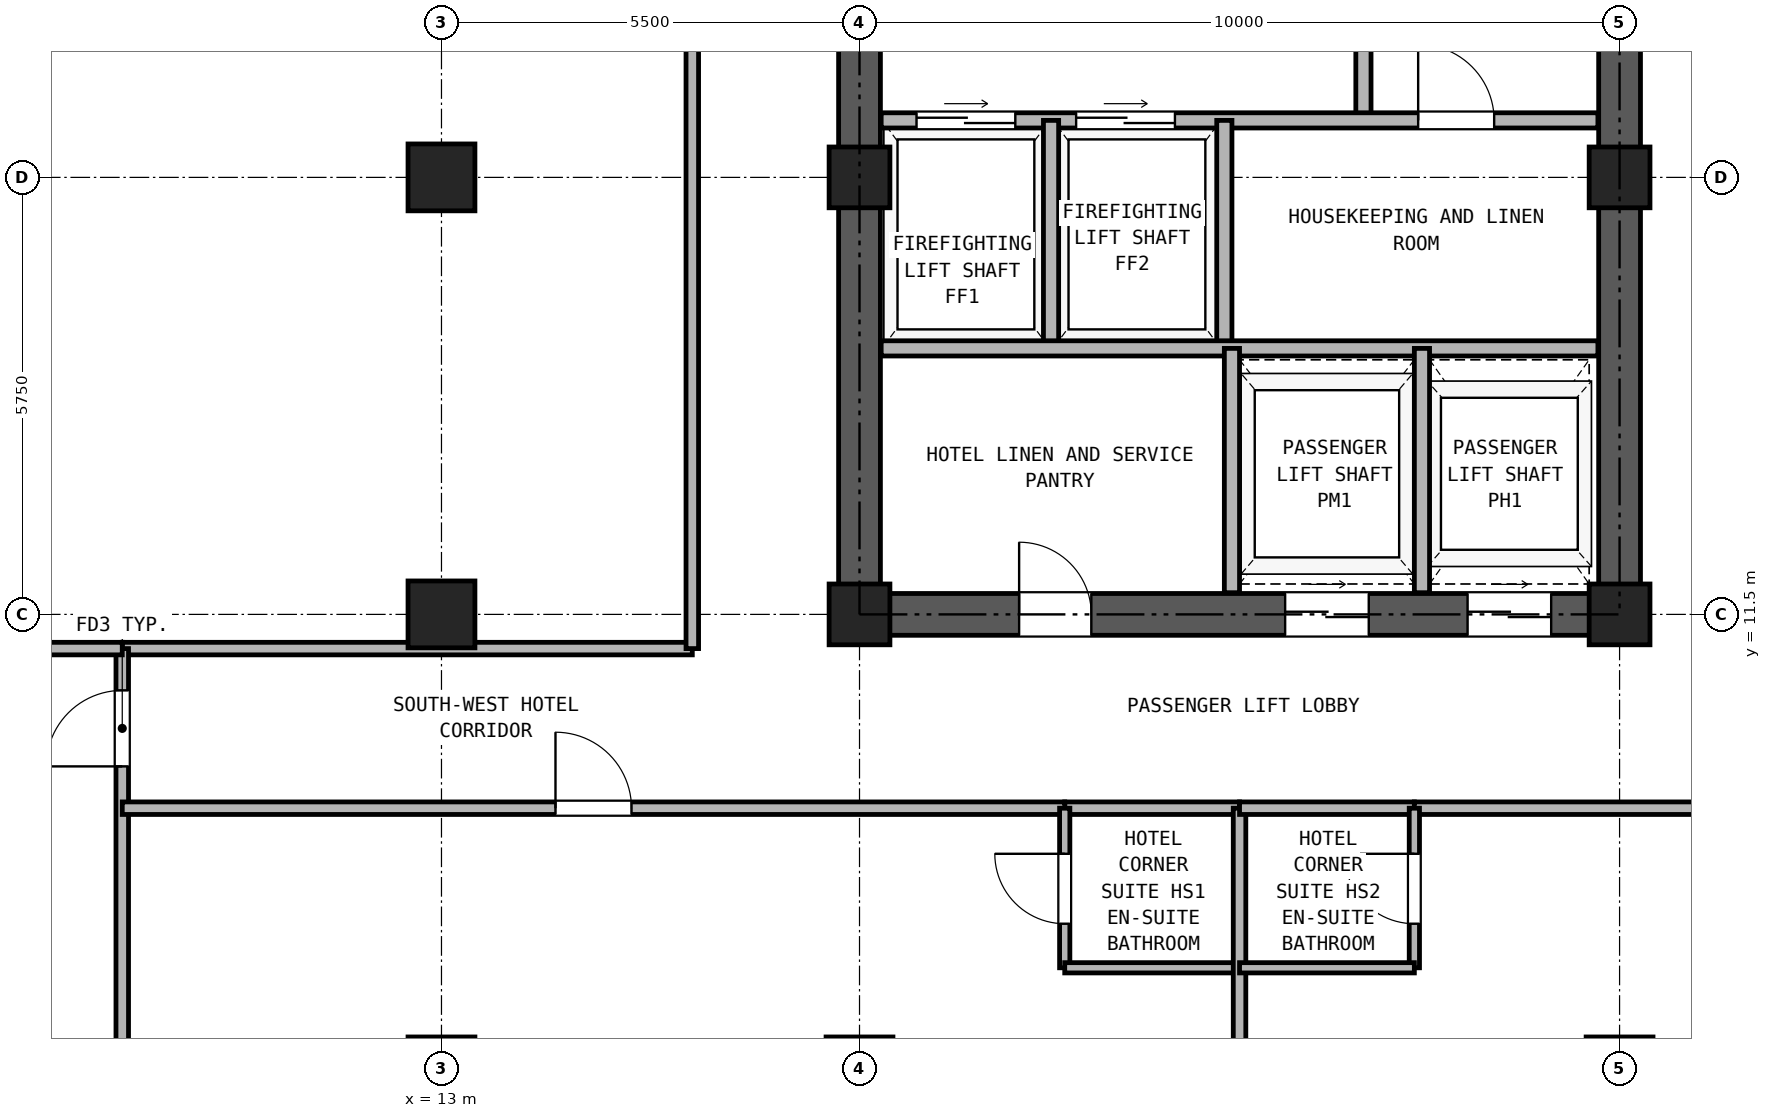
"""IFC4 building model, lengths in metres.
Left out: names, types, materials, properties, quantities, classifications, styles, units other than length and angle.
Written with IfcOpenShell. Run it as: python <this file> out.ifc"""

import sys

from ifc_helpers import new_model, si_unit, direction, frame, frame_2d, origin, origin_2d, place, context, subcontext, project, spatial, rectangle, hollow_rectangle, extrude, source, transform, mapped, element, fill, save


model = new_model("IFC4")
c1 = context("Model", 3, precision=1e-05, world=origin(), true_north=direction((0.0, 1.0)))
c2 = subcontext(c1, "Body", "Model", "MODEL_VIEW")
j1 = project(units=[si_unit("LENGTHUNIT", "METRE"), si_unit("PLANEANGLEUNIT", "RADIAN")], contexts=[c1])
p1 = place(None, origin())
s1 = spatial("IfcSite", under=j1, at=p1, CompositionType="ELEMENT")
p2 = place(p1, origin())
s2 = spatial("IfcBuilding", under=s1, at=p2, CompositionType="ELEMENT")
p3 = place(p2, frame((0.0, 0.0, 140.7)))
s3 = spatial("IfcBuildingStorey", under=s2, at=p3, CompositionType="ELEMENT", Elevation=140.7)
m1 = source(origin(), c2, "Body", "SweptSolid", [
    extrude(hollow_rectangle(XDim=0.88, YDim=0.88, WallThickness=0.05, at=origin_2d()), origin(), (0.0, 0.0, 1.0), 2.84),
])
for number, where, z_axis, x_axis in (
    (1, (13.0, 5.5, 0.0), (0.0, 0.0, 1.0), (1.0, 0.0, 0.0)),
    (2, (13.0, 11.5, 0.0), (0.0, 0.0, 1.0), (1.0, 0.0, 0.0)),
    (3, (13.0, 17.25, 0.0), (0.0, 0.0, 1.0), (1.0, 0.0, 0.0)),
    (4, (18.5, 5.5, 0.0), (0.0, 0.0, 1.0), (1.0, 0.0, 0.0)),
):
    element("IfcColumn", number, at=place(p3, frame(where, z_axis=z_axis, x_axis=x_axis)), inside=s3, PredefinedType="COLUMN", context=c2, shape_type="MappedRepresentation", body=[
        mapped(m1, transform((0.0, 0.0, 0.0), x_axis=(1.0, 0.0, 0.0), y_axis=(0.0, 1.0, 0.0), z_axis=(0.0, 0.0, 1.0), scale=1.0)),
    ])
m2 = source(origin(), c2, "Body", "SweptSolid", [
    extrude(hollow_rectangle(XDim=0.8, YDim=0.8, WallThickness=0.045, at=origin_2d()), origin(), (0.0, 0.0, 1.0), 2.84),
])
for number, where, z_axis, x_axis in (
    (5, (18.5, 11.5, 0.0), (0.0, 0.0, 1.0), (1.0, 0.0, 0.0)),
    (6, (18.5, 17.25, 0.0), (0.0, 0.0, 1.0), (1.0, 0.0, 0.0)),
):
    element("IfcColumn", number, at=place(p3, frame(where, z_axis=z_axis, x_axis=x_axis)), inside=s3, PredefinedType="COLUMN", context=c2, shape_type="MappedRepresentation", body=[
        mapped(m2, transform((0.0, 0.0, 0.0), x_axis=(1.0, 0.0, 0.0), y_axis=(0.0, 1.0, 0.0), z_axis=(0.0, 0.0, 1.0), scale=1.0)),
    ])
p4 = place(p3, frame((28.5, 5.5, 0.0), z_axis=(0.0, 0.0, 1.0), x_axis=(1.0, 0.0, 0.0)))
e7 = element("IfcColumn", 7, at=p4, inside=s3, PredefinedType="COLUMN", context=c2, shape_type="MappedRepresentation", body=[
    mapped(m1, transform((0.0, 0.0, 0.0), x_axis=(1.0, 0.0, 0.0), y_axis=(0.0, 1.0, 0.0), z_axis=(0.0, 0.0, 1.0), scale=1.0)),
])
for number, where, z_axis, x_axis in (
    (8, (28.5, 11.5, 0.0), (0.0, 0.0, 1.0), (1.0, 0.0, 0.0)),
    (9, (28.5, 17.25, 0.0), (0.0, 0.0, 1.0), (1.0, 0.0, 0.0)),
):
    element("IfcColumn", number, at=place(p3, frame(where, z_axis=z_axis, x_axis=x_axis)), inside=s3, PredefinedType="COLUMN", context=c2, shape_type="MappedRepresentation", body=[
        mapped(m2, transform((0.0, 0.0, 0.0), x_axis=(1.0, 0.0, 0.0), y_axis=(0.0, 1.0, 0.0), z_axis=(0.0, 0.0, 1.0), scale=1.0)),
    ])
p5 = place(p3, frame((18.225, 11.5, 0.0), z_axis=(0.0, 0.0, 1.0), x_axis=(1.0, 0.0, 0.0)))
e10 = element("IfcWall", 10, at=p5, inside=s3, PredefinedType="SHEAR", context=c2, shape_type="SweptSolid", body=[
    extrude(rectangle(XDim=10.55, YDim=0.55, at=frame_2d((5.275, 0.0))), origin(), (0.0, 0.0, 1.0), 2.84),
])
p6 = place(p5, frame((2.375, 0.0, 0.0)))
e11 = element("IfcOpeningElement", 11, at=p6, cuts=e10, PredefinedType="OPENING", context=c2, shape_type="SweptSolid", body=[
    extrude(rectangle(XDim=0.95, YDim=2.15, at=frame_2d((0.475, 1.075))), frame((0.0, 0.285, 0.0), z_axis=(0.0, -1.0, 0.0), x_axis=(1.0, 0.0, 0.0)), (0.0, 0.0, 1.0), 0.57),
])
p7 = place(p5, frame((5.875, 0.0, 0.0)))
e12 = element("IfcOpeningElement", 12, at=p7, cuts=e10, PredefinedType="OPENING", context=c2, shape_type="SweptSolid", body=[
    extrude(rectangle(XDim=1.1, YDim=2.25, at=frame_2d((0.55, 1.125))), frame((0.0, 0.285, 0.0), z_axis=(0.0, -1.0, 0.0), x_axis=(1.0, 0.0, 0.0)), (0.0, 0.0, 1.0), 0.57),
])
p8 = place(p5, frame((8.275, 0.0, 0.0)))
e13 = element("IfcOpeningElement", 13, at=p8, cuts=e10, PredefinedType="OPENING", context=c2, shape_type="SweptSolid", body=[
    extrude(rectangle(XDim=1.1, YDim=2.25, at=frame_2d((0.55, 1.125))), frame((0.0, 0.285, 0.0), z_axis=(0.0, -1.0, 0.0), x_axis=(1.0, 0.0, 0.0)), (0.0, 0.0, 1.0), 0.57),
])
p9 = place(p3, frame((18.5, 11.775, 0.0), z_axis=(0.0, 0.0, 1.0), x_axis=(0.0, 1.0, 0.0)))
e14 = element("IfcWall", 14, at=p9, inside=s3, PredefinedType="SHEAR", context=c2, shape_type="SweptSolid", body=[
    extrude(rectangle(XDim=16.7, YDim=0.55, at=frame_2d((8.35, 0.0))), origin(), (0.0, 0.0, 1.0), 2.84),
])
p10 = place(p9, frame((7.375, 0.0, 0.0)))
e15 = element("IfcOpeningElement", 15, at=p10, cuts=e14, PredefinedType="OPENING", context=c2, shape_type="SweptSolid", body=[
    extrude(rectangle(XDim=1.15, YDim=2.2, at=frame_2d((0.575, 1.1))), frame((0.0, 0.285, 0.0), z_axis=(0.0, -1.0, 0.0), x_axis=(1.0, 0.0, 0.0)), (0.0, 0.0, 1.0), 0.57),
])
p11 = place(p3, frame((28.5, 11.775, 0.0), z_axis=(0.0, 0.0, 1.0), x_axis=(0.0, 1.0, 0.0)))
e16 = element("IfcWall", 16, at=p11, inside=s3, PredefinedType="SHEAR", context=c2, shape_type="SweptSolid", body=[
    extrude(rectangle(XDim=16.7, YDim=0.55, at=frame_2d((8.35, 0.0))), origin(), (0.0, 0.0, 1.0), 2.84),
])
p12 = place(p11, frame((7.375, 0.0, 0.0)))
e17 = element("IfcOpeningElement", 17, at=p12, cuts=e16, PredefinedType="OPENING", context=c2, shape_type="SweptSolid", body=[
    extrude(rectangle(XDim=1.15, YDim=2.2, at=frame_2d((0.575, 1.1))), frame((0.0, 0.285, 0.0), z_axis=(0.0, -1.0, 0.0), x_axis=(1.0, 0.0, 0.0)), (0.0, 0.0, 1.0), 0.57),
])
p13 = place(p3, frame((25.13, 18.0, 0.0), z_axis=(0.0, 0.0, 1.0), x_axis=(0.0, 1.0, 0.0)))
e18 = element("IfcWall", 18, at=p13, inside=s3, PredefinedType="PARTITIONING", context=c2, shape_type="SweptSolid", body=[
    extrude(rectangle(XDim=3.39, YDim=0.2, at=frame_2d((1.695, 0.0))), origin(), (0.0, 0.0, 1.0), 2.84),
])
p14 = place(p13, frame((1.1, 0.0, 0.0)))
e19 = element("IfcOpeningElement", 19, at=p14, cuts=e18, PredefinedType="OPENING", context=c2, shape_type="SweptSolid", body=[
    extrude(rectangle(XDim=1.15, YDim=2.2, at=frame_2d((0.575, 1.1))), frame((0.0, 0.11, 0.0), z_axis=(0.0, -1.0, 0.0), x_axis=(1.0, 0.0, 0.0)), (0.0, 0.0, 1.0), 0.22),
])
p15 = place(p3, frame((18.785, 18.0, 0.0), z_axis=(0.0, 0.0, 1.0), x_axis=(1.0, 0.0, 0.0)))
e20 = element("IfcWall", 20, at=p15, inside=s3, PredefinedType="PARTITIONING", context=c2, shape_type="SweptSolid", body=[
    extrude(rectangle(XDim=9.43, YDim=0.2, at=frame_2d((4.715, 0.0))), origin(), (0.0, 0.0, 1.0), 2.84),
])
p16 = place(p15, frame((0.465, 0.0, 0.0)))
e21 = element("IfcOpeningElement", 21, at=p16, cuts=e20, PredefinedType="OPENING", context=c2, shape_type="SweptSolid", body=[
    extrude(rectangle(XDim=1.3, YDim=2.3, at=frame_2d((0.65, 1.15))), frame((0.0, 0.11, 0.0), z_axis=(0.0, -1.0, 0.0), x_axis=(1.0, 0.0, 0.0)), (0.0, 0.0, 1.0), 0.22),
])
p17 = place(p15, frame((2.565, 0.0, 0.0)))
e22 = element("IfcOpeningElement", 22, at=p17, cuts=e20, PredefinedType="OPENING", context=c2, shape_type="SweptSolid", body=[
    extrude(rectangle(XDim=1.3, YDim=2.3, at=frame_2d((0.65, 1.15))), frame((0.0, 0.11, 0.0), z_axis=(0.0, -1.0, 0.0), x_axis=(1.0, 0.0, 0.0)), (0.0, 0.0, 1.0), 0.22),
])
p18 = place(p15, frame((7.065, 0.0, 0.0)))
e23 = element("IfcOpeningElement", 23, at=p18, cuts=e20, PredefinedType="OPENING", context=c2, shape_type="SweptSolid", body=[
    extrude(rectangle(XDim=1.0, YDim=2.15, at=frame_2d((0.5, 1.075))), frame((0.0, 0.11, 0.0), z_axis=(0.0, -1.0, 0.0), x_axis=(1.0, 0.0, 0.0)), (0.0, 0.0, 1.0), 0.22),
])
for number, where, z_axis, x_axis in (
    (24, (21.02, 15.0, 0.0), (0.0, 0.0, 1.0), (0.0, 1.0, 0.0)),
    (25, (23.3, 15.0, 0.0), (0.0, 0.0, 1.0), (0.0, 1.0, 0.0)),
):
    element("IfcWall", number, at=place(p3, frame(where, z_axis=z_axis, x_axis=x_axis)), inside=s3, PredefinedType="PARTITIONING", context=c2, shape_type="SweptSolid", body=[
        extrude(rectangle(XDim=3.0, YDim=0.2, at=frame_2d((1.5, 0.0))), origin(), (0.0, 0.0, 1.0), 2.84),
    ])
p19 = place(p3, frame((18.785, 15.0, 0.0), z_axis=(0.0, 0.0, 1.0), x_axis=(1.0, 0.0, 0.0)))
e26 = element("IfcWall", 26, at=p19, inside=s3, PredefinedType="PARTITIONING", context=c2, shape_type="SweptSolid", body=[
    extrude(rectangle(XDim=9.43, YDim=0.2, at=frame_2d((4.715, 0.0))), origin(), (0.0, 0.0, 1.0), 2.84),
])
for number, where, z_axis, x_axis in (
    (27, (23.4, 11.785, 0.0), (0.0, 0.0, 1.0), (0.0, 1.0, 0.0)),
    (28, (25.9, 11.785, 0.0), (0.0, 0.0, 1.0), (0.0, 1.0, 0.0)),
):
    element("IfcWall", number, at=place(p3, frame(where, z_axis=z_axis, x_axis=x_axis)), inside=s3, PredefinedType="PARTITIONING", context=c2, shape_type="SweptSolid", body=[
        extrude(rectangle(XDim=3.215, YDim=0.2, at=frame_2d((1.607, 0.0))), origin(), (0.0, 0.0, 1.0), 2.84),
    ])
p20 = place(p3, frame((8.8, 11.05, 0.0), z_axis=(0.0, 0.0, 1.0), x_axis=(1.0, 0.0, 0.0)))
e29 = element("IfcWall", 29, at=p20, inside=s3, PredefinedType="PARTITIONING", context=c2, shape_type="SweptSolid", body=[
    extrude(rectangle(XDim=7.5, YDim=0.165, at=frame_2d((3.75, 0.0))), origin(), (0.0, 0.0, 1.0), 2.84),
])
p21 = place(p3, frame((16.3, 11.05, 0.0), z_axis=(0.0, 0.0, 1.0), x_axis=(0.0, 1.0, 0.0)))
e30 = element("IfcWall", 30, at=p21, inside=s3, PredefinedType="PARTITIONING", context=c2, shape_type="SweptSolid", body=[
    extrude(rectangle(XDim=18.2, YDim=0.165, at=frame_2d((9.1, 0.0))), origin(), (0.0, 0.0, 1.0), 2.84),
])
p22 = place(p21, frame((8.6, 0.0, 0.0)))
e31 = element("IfcOpeningElement", 31, at=p22, cuts=e30, PredefinedType="OPENING", context=c2, shape_type="SweptSolid", body=[
    extrude(rectangle(XDim=0.95, YDim=2.15, at=frame_2d((0.475, 1.075))), frame((0.0, 0.093, 0.0), z_axis=(0.0, -1.0, 0.0), x_axis=(1.0, 0.0, 0.0)), (0.0, 0.0, 1.0), 0.185),
])
p23 = place(p3, frame((8.8, 0.16, 0.0), z_axis=(0.0, 0.0, 1.0), x_axis=(0.0, 1.0, 0.0)))
e32 = element("IfcWall", 32, at=p23, inside=s3, PredefinedType="PARTITIONING", context=c2, shape_type="SweptSolid", body=[
    extrude(rectangle(XDim=10.89, YDim=0.165, at=frame_2d((5.445, 0.0))), origin(), (0.0, 0.0, 1.0), 2.84),
])
p24 = place(p23, frame((9.34, 0.0, 0.0)))
e33 = element("IfcOpeningElement", 33, at=p24, cuts=e32, PredefinedType="OPENING", context=c2, shape_type="SweptSolid", body=[
    extrude(rectangle(XDim=1.0, YDim=2.15, at=frame_2d((0.5, 1.075))), frame((0.0, 0.093, 0.0), z_axis=(0.0, -1.0, 0.0), x_axis=(1.0, 0.0, 0.0)), (0.0, 0.0, 1.0), 0.185),
])
p25 = place(p3, frame((0.16, 11.05, 0.0), z_axis=(0.0, 0.0, 1.0), x_axis=(1.0, 0.0, 0.0)))
e34 = element("IfcWall", 34, at=p25, inside=s3, PredefinedType="PARTITIONING", context=c2, shape_type="SweptSolid", body=[
    extrude(rectangle(XDim=8.64, YDim=0.165, at=frame_2d((4.32, 0.0))), origin(), (0.0, 0.0, 1.0), 2.84),
])
p26 = place(p3, frame((21.2, 8.95, 0.0), z_axis=(0.0, 0.0, 1.0), x_axis=(1.0, 0.0, 0.0)))
e35 = element("IfcWall", 35, at=p26, inside=s3, PredefinedType="PARTITIONING", context=c2, shape_type="SweptSolid", body=[
    extrude(rectangle(XDim=2.3, YDim=0.165, at=frame_2d((1.15, 0.0))), origin(), (0.0, 0.0, 1.0), 2.84),
])
p27 = place(p3, frame((8.8, 8.95, 0.0), z_axis=(0.0, 0.0, 1.0), x_axis=(1.0, 0.0, 0.0)))
e36 = element("IfcWall", 36, at=p27, inside=s3, PredefinedType="PARTITIONING", context=c2, shape_type="SweptSolid", body=[
    extrude(rectangle(XDim=12.4, YDim=0.165, at=frame_2d((6.2, 0.0))), origin(), (0.0, 0.0, 1.0), 2.84),
])
p28 = place(p27, frame((5.7, 0.0, 0.0)))
e37 = element("IfcOpeningElement", 37, at=p28, cuts=e36, PredefinedType="OPENING", context=c2, shape_type="SweptSolid", body=[
    extrude(rectangle(XDim=1.0, YDim=2.15, at=frame_2d((0.5, 1.075))), frame((0.0, 0.093, 0.0), z_axis=(0.0, -1.0, 0.0), x_axis=(1.0, 0.0, 0.0)), (0.0, 0.0, 1.0), 0.185),
])
p29 = place(p3, frame((21.2, 6.85, 0.0), z_axis=(0.0, 0.0, 1.0), x_axis=(0.0, 1.0, 0.0)))
e38 = element("IfcWall", 38, at=p29, inside=s3, PredefinedType="PARTITIONING", context=c2, shape_type="SweptSolid", body=[
    extrude(rectangle(XDim=2.1, YDim=0.135, at=frame_2d((1.05, 0.0))), origin(), (0.0, 0.0, 1.0), 2.84),
])
p30 = place(p29, frame((0.58, 0.0, 0.0)))
e39 = element("IfcOpeningElement", 39, at=p30, cuts=e38, PredefinedType="OPENING", context=c2, shape_type="SweptSolid", body=[
    extrude(rectangle(XDim=0.92, YDim=2.1, at=frame_2d((0.46, 1.05))), frame((0.0, 0.077, 0.0), z_axis=(0.0, -1.0, 0.0), x_axis=(1.0, 0.0, 0.0)), (0.0, 0.0, 1.0), 0.155),
])
p31 = place(p3, frame((21.2, 6.85, 0.0), z_axis=(0.0, 0.0, 1.0), x_axis=(1.0, 0.0, 0.0)))
e40 = element("IfcWall", 40, at=p31, inside=s3, PredefinedType="PARTITIONING", context=c2, shape_type="SweptSolid", body=[
    extrude(rectangle(XDim=2.3, YDim=0.135, at=frame_2d((1.15, 0.0))), origin(), (0.0, 0.0, 1.0), 2.84),
])
p32 = place(p3, frame((23.5, 0.16, 0.0), z_axis=(0.0, 0.0, 1.0), x_axis=(0.0, 1.0, 0.0)))
e41 = element("IfcWall", 41, at=p32, inside=s3, PredefinedType="PARTITIONING", context=c2, shape_type="SweptSolid", body=[
    extrude(rectangle(XDim=8.79, YDim=0.165, at=frame_2d((4.395, 0.0))), origin(), (0.0, 0.0, 1.0), 2.84),
])
p33 = place(p3, frame((23.5, 8.95, 0.0), z_axis=(0.0, 0.0, 1.0), x_axis=(1.0, 0.0, 0.0)))
e42 = element("IfcWall", 42, at=p33, inside=s3, PredefinedType="PARTITIONING", context=c2, shape_type="SweptSolid", body=[
    extrude(rectangle(XDim=2.3, YDim=0.165, at=frame_2d((1.15, 0.0))), origin(), (0.0, 0.0, 1.0), 2.84),
])
p34 = place(p3, frame((25.8, 8.95, 0.0), z_axis=(0.0, 0.0, 1.0), x_axis=(1.0, 0.0, 0.0)))
e43 = element("IfcWall", 43, at=p34, inside=s3, PredefinedType="PARTITIONING", context=c2, shape_type="SweptSolid", body=[
    extrude(rectangle(XDim=12.4, YDim=0.165, at=frame_2d((6.2, 0.0))), origin(), (0.0, 0.0, 1.0), 2.84),
])
p35 = place(p34, frame((5.7, 0.0, 0.0)))
e44 = element("IfcOpeningElement", 44, at=p35, cuts=e43, PredefinedType="OPENING", context=c2, shape_type="SweptSolid", body=[
    extrude(rectangle(XDim=1.0, YDim=2.15, at=frame_2d((0.5, 1.075))), frame((0.0, 0.093, 0.0), z_axis=(0.0, -1.0, 0.0), x_axis=(1.0, 0.0, 0.0)), (0.0, 0.0, 1.0), 0.185),
])
p36 = place(p3, frame((25.8, 6.85, 0.0), z_axis=(0.0, 0.0, 1.0), x_axis=(0.0, 1.0, 0.0)))
e45 = element("IfcWall", 45, at=p36, inside=s3, PredefinedType="PARTITIONING", context=c2, shape_type="SweptSolid", body=[
    extrude(rectangle(XDim=2.1, YDim=0.135, at=frame_2d((1.05, 0.0))), origin(), (0.0, 0.0, 1.0), 2.84),
])
p37 = place(p36, frame((0.58, 0.0, 0.0)))
e46 = element("IfcOpeningElement", 46, at=p37, cuts=e45, PredefinedType="OPENING", context=c2, shape_type="SweptSolid", body=[
    extrude(rectangle(XDim=0.92, YDim=2.1, at=frame_2d((0.46, 1.05))), frame((0.0, 0.077, 0.0), z_axis=(0.0, -1.0, 0.0), x_axis=(1.0, 0.0, 0.0)), (0.0, 0.0, 1.0), 0.155),
])
p38 = place(p3, frame((23.5, 6.85, 0.0), z_axis=(0.0, 0.0, 1.0), x_axis=(1.0, 0.0, 0.0)))
e47 = element("IfcWall", 47, at=p38, inside=s3, PredefinedType="PARTITIONING", context=c2, shape_type="SweptSolid", body=[
    extrude(rectangle(XDim=2.3, YDim=0.135, at=frame_2d((1.15, 0.0))), origin(), (0.0, 0.0, 1.0), 2.84),
])
p39 = place(p16, origin())
e48 = element("IfcDoor", 48, at=p39, inside=s3, OperationType="DOUBLE_DOOR_SLIDING", PredefinedType="DOOR", context=c2, shape_type="SweptSolid", body=[
    extrude(rectangle(XDim=1.3, YDim=2.3, at=frame_2d((0.65, 1.15))), frame((0.0, 0.025, 0.0), z_axis=(0.0, -1.0, 0.0), x_axis=(1.0, 0.0, 0.0)), (0.0, 0.0, 1.0), 0.05),
])
fill(e21, e48)
p40 = place(p17, origin())
e49 = element("IfcDoor", 49, at=p40, inside=s3, OperationType="DOUBLE_DOOR_SLIDING", PredefinedType="DOOR", context=c2, shape_type="SweptSolid", body=[
    extrude(rectangle(XDim=1.3, YDim=2.3, at=frame_2d((0.65, 1.15))), frame((0.0, 0.025, 0.0), z_axis=(0.0, -1.0, 0.0), x_axis=(1.0, 0.0, 0.0)), (0.0, 0.0, 1.0), 0.05),
])
fill(e22, e49)
p41 = place(p18, frame((1.0, 0.0, 0.0), z_axis=(0.0, 0.0, 1.0), x_axis=(-1.0, 0.0, 0.0)))
e50 = element("IfcDoor", 50, at=p41, inside=s3, OperationType="SINGLE_SWING_LEFT", PredefinedType="DOOR", context=c2, shape_type="SweptSolid", body=[
    extrude(rectangle(XDim=1.0, YDim=2.15, at=frame_2d((0.5, 1.075))), frame((0.0, 0.025, 0.0), z_axis=(0.0, -1.0, 0.0), x_axis=(1.0, 0.0, 0.0)), (0.0, 0.0, 1.0), 0.05),
])
fill(e23, e50)
p42 = place(p6, frame((0.95, 0.0, 0.0), z_axis=(0.0, 0.0, 1.0), x_axis=(-1.0, 0.0, 0.0)))
e51 = element("IfcDoor", 51, at=p42, inside=s3, OperationType="SINGLE_SWING_LEFT", PredefinedType="DOOR", context=c2, shape_type="SweptSolid", body=[
    extrude(rectangle(XDim=0.95, YDim=2.15, at=frame_2d((0.475, 1.075))), frame((0.0, 0.025, 0.0), z_axis=(0.0, -1.0, 0.0), x_axis=(1.0, 0.0, 0.0)), (0.0, 0.0, 1.0), 0.05),
])
fill(e11, e51)
p43 = place(p7, frame((1.1, 0.0, 0.0), z_axis=(0.0, 0.0, 1.0), x_axis=(-1.0, 0.0, 0.0)))
e52 = element("IfcDoor", 52, at=p43, inside=s3, OperationType="DOUBLE_DOOR_SLIDING", PredefinedType="DOOR", context=c2, shape_type="SweptSolid", body=[
    extrude(rectangle(XDim=1.1, YDim=2.25, at=frame_2d((0.55, 1.125))), frame((0.0, 0.025, 0.0), z_axis=(0.0, -1.0, 0.0), x_axis=(1.0, 0.0, 0.0)), (0.0, 0.0, 1.0), 0.05),
])
fill(e12, e52)
p44 = place(p8, frame((1.1, 0.0, 0.0), z_axis=(0.0, 0.0, 1.0), x_axis=(-1.0, 0.0, 0.0)))
e53 = element("IfcDoor", 53, at=p44, inside=s3, OperationType="DOUBLE_DOOR_SLIDING", PredefinedType="DOOR", context=c2, shape_type="SweptSolid", body=[
    extrude(rectangle(XDim=1.1, YDim=2.25, at=frame_2d((0.55, 1.125))), frame((0.0, 0.025, 0.0), z_axis=(0.0, -1.0, 0.0), x_axis=(1.0, 0.0, 0.0)), (0.0, 0.0, 1.0), 0.05),
])
fill(e13, e53)
p45 = place(p24, origin())
e54 = element("IfcDoor", 54, at=p45, inside=s3, OperationType="SINGLE_SWING_LEFT", PredefinedType="DOOR", context=c2, shape_type="SweptSolid", body=[
    extrude(rectangle(XDim=1.0, YDim=2.15, at=frame_2d((0.5, 1.075))), frame((0.0, 0.025, 0.0), z_axis=(0.0, -1.0, 0.0), x_axis=(1.0, 0.0, 0.0)), (0.0, 0.0, 1.0), 0.05),
])
fill(e33, e54)
p46 = place(p30, origin())
e55 = element("IfcDoor", 55, at=p46, inside=s3, OperationType="SINGLE_SWING_RIGHT", PredefinedType="DOOR", context=c2, shape_type="SweptSolid", body=[
    extrude(rectangle(XDim=0.92, YDim=2.1, at=frame_2d((0.46, 1.05))), frame((0.0, 0.025, 0.0), z_axis=(0.0, -1.0, 0.0), x_axis=(1.0, 0.0, 0.0)), (0.0, 0.0, 1.0), 0.05),
])
fill(e39, e55)
p47 = place(p28, frame((1.0, 0.0, 0.0), z_axis=(0.0, 0.0, 1.0), x_axis=(-1.0, 0.0, 0.0)))
e56 = element("IfcDoor", 56, at=p47, inside=s3, OperationType="SINGLE_SWING_LEFT", PredefinedType="DOOR", context=c2, shape_type="SweptSolid", body=[
    extrude(rectangle(XDim=1.0, YDim=2.15, at=frame_2d((0.5, 1.075))), frame((0.0, 0.025, 0.0), z_axis=(0.0, -1.0, 0.0), x_axis=(1.0, 0.0, 0.0)), (0.0, 0.0, 1.0), 0.05),
])
fill(e37, e56)
p48 = place(p37, frame((0.92, 0.0, 0.0), z_axis=(0.0, 0.0, 1.0), x_axis=(-1.0, 0.0, 0.0)))
e57 = element("IfcDoor", 57, at=p48, inside=s3, OperationType="SINGLE_SWING_RIGHT", PredefinedType="DOOR", context=c2, shape_type="SweptSolid", body=[
    extrude(rectangle(XDim=0.92, YDim=2.1, at=frame_2d((0.46, 1.05))), frame((0.0, 0.025, 0.0), z_axis=(0.0, -1.0, 0.0), x_axis=(1.0, 0.0, 0.0)), (0.0, 0.0, 1.0), 0.05),
])
fill(e46, e57)
save(model, sys.argv[1])
